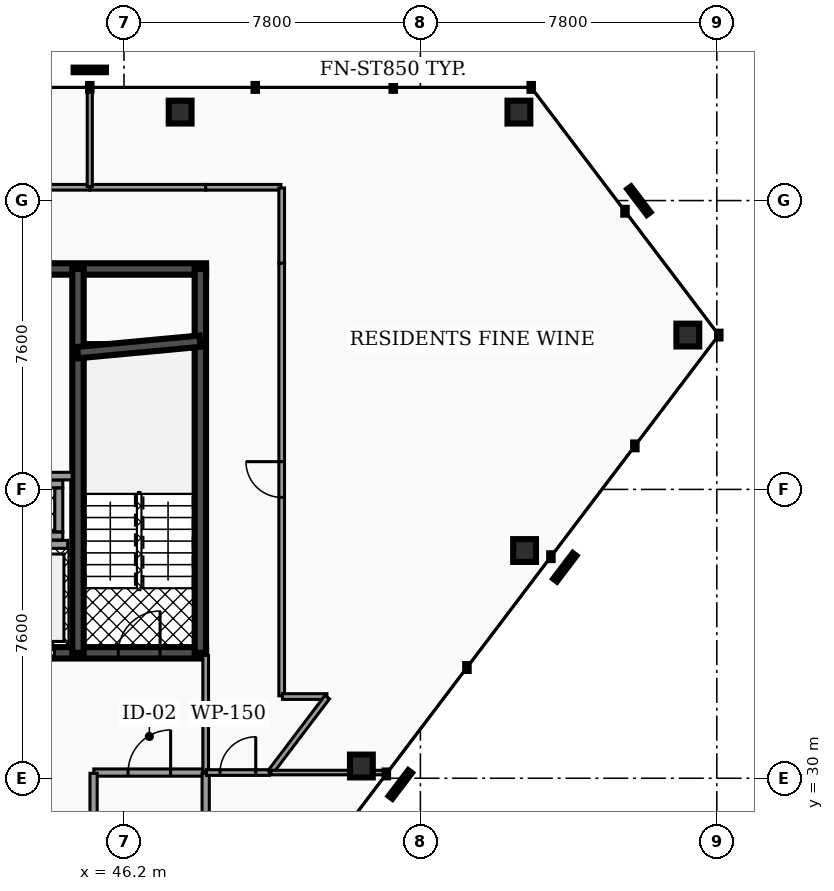
"""IFC4 building model, lengths in metres.
Left out: names, types, materials, properties, quantities, classifications, styles, units other than length and angle.
Written with IfcOpenShell. Run it as: python <this file> out.ifc"""

import sys

from ifc_helpers import new_model, si_unit, direction, frame, frame_2d, origin, origin_2d, place, context, subcontext, project, spatial, rectangle, hollow_rectangle, extrude, element, fill, save


model = new_model("IFC4")
c1 = context("Model", 3, precision=1e-05, world=origin(), true_north=direction((0.0, 1.0)))
c2 = subcontext(c1, "Body", "Model", "MODEL_VIEW")
j1 = project(units=[si_unit("LENGTHUNIT", "METRE"), si_unit("PLANEANGLEUNIT", "RADIAN")], contexts=[c1])
p1 = place(None, origin())
s1 = spatial("IfcSite", under=j1, at=p1, CompositionType="ELEMENT")
p2 = place(p1, origin())
s2 = spatial("IfcBuilding", under=s1, at=p2, CompositionType="ELEMENT")
p3 = place(p2, frame((0.0, 0.0, 235.96)))
s3 = spatial("IfcBuildingStorey", under=s2, at=p3, CompositionType="ELEMENT", Elevation=235.96)
p4 = place(p3, frame((28.5, 43.4, 0.0), z_axis=(0.0, 0.0, 1.0), x_axis=(1.0, 0.0, 0.0)))
e1 = element("IfcWall", 1, at=p4, inside=s3, PredefinedType="SHEAR", context=c2, shape_type="SweptSolid", body=[
    extrude(rectangle(XDim=19.86, YDim=0.3, at=frame_2d((9.93, 0.0))), origin(), (0.0, 0.0, 1.0), 3.18),
])
p5 = place(p3, frame((28.5, 33.3, 0.0), z_axis=(0.0, 0.0, 1.0), x_axis=(1.0, 0.0, 0.0)))
e2 = element("IfcWall", 2, at=p5, inside=s3, PredefinedType="SHEAR", context=c2, shape_type="SweptSolid", body=[
    extrude(rectangle(XDim=19.86, YDim=0.3, at=frame_2d((9.93, 0.0))), origin(), (0.0, 0.0, 1.0), 3.18),
])
p6 = place(p5, frame((3.93, 0.0, 0.0)))
e3 = element("IfcOpeningElement", 3, at=p6, cuts=e2, PredefinedType="OPENING", context=c2, shape_type="SweptSolid", body=[
    extrude(rectangle(XDim=1.1, YDim=2.15, at=frame_2d((0.55, 1.075))), frame((0.0, 0.16, 0.0), z_axis=(0.0, -1.0, 0.0), x_axis=(1.0, 0.0, 0.0)), (0.0, 0.0, 1.0), 0.32),
])
p7 = place(p5, frame((14.77, 0.0, 0.0)))
e4 = element("IfcOpeningElement", 4, at=p7, cuts=e2, PredefinedType="OPENING", context=c2, shape_type="SweptSolid", body=[
    extrude(rectangle(XDim=1.1, YDim=2.15, at=frame_2d((0.55, 1.075))), frame((0.0, 0.16, 0.0), z_axis=(0.0, -1.0, 0.0), x_axis=(1.0, 0.0, 0.0)), (0.0, 0.0, 1.0), 0.32),
])
p8 = place(p5, frame((11.25, 0.0, 0.0)))
e5 = element("IfcOpeningElement", 5, at=p8, cuts=e2, PredefinedType="OPENING", context=c2, shape_type="SweptSolid", body=[
    extrude(rectangle(XDim=1.0, YDim=2.1, at=frame_2d((0.5, 1.05))), frame((0.0, 0.16, 0.0), z_axis=(0.0, -1.0, 0.0), x_axis=(1.0, 0.0, 0.0)), (0.0, 0.0, 1.0), 0.32),
])
p9 = place(p5, frame((12.95, 0.0, 0.0)))
e6 = element("IfcOpeningElement", 6, at=p9, cuts=e2, PredefinedType="OPENING", context=c2, shape_type="SweptSolid", body=[
    extrude(rectangle(XDim=1.0, YDim=2.1, at=frame_2d((0.5, 1.05))), frame((0.0, 0.16, 0.0), z_axis=(0.0, -1.0, 0.0), x_axis=(1.0, 0.0, 0.0)), (0.0, 0.0, 1.0), 0.32),
])
p10 = place(p5, frame((5.85, 0.0, 0.0)))
e7 = element("IfcOpeningElement", 7, at=p10, cuts=e2, PredefinedType="OPENING", context=c2, shape_type="SweptSolid", body=[
    extrude(rectangle(XDim=1.0, YDim=2.1, at=frame_2d((0.5, 1.05))), frame((0.0, 0.16, 0.0), z_axis=(0.0, -1.0, 0.0), x_axis=(1.0, 0.0, 0.0)), (0.0, 0.0, 1.0), 0.32),
])
p11 = place(p5, frame((1.21, 0.0, 0.0)))
e8 = element("IfcOpeningElement", 8, at=p11, cuts=e2, PredefinedType="OPENING", context=c2, shape_type="SweptSolid", body=[
    extrude(rectangle(XDim=1.1, YDim=2.2, at=frame_2d((0.55, 1.1))), frame((0.0, 0.16, 0.0), z_axis=(0.0, -1.0, 0.0), x_axis=(1.0, 0.0, 0.0)), (0.0, 0.0, 1.0), 0.32),
])
p12 = place(p5, frame((9.34, 0.0, 0.0)))
e9 = element("IfcOpeningElement", 9, at=p12, cuts=e2, PredefinedType="OPENING", context=c2, shape_type="SweptSolid", body=[
    extrude(rectangle(XDim=1.12, YDim=2.05, at=frame_2d((0.56, 1.025))), frame((0.0, 0.16, 0.0), z_axis=(0.0, -1.0, 0.0), x_axis=(1.0, 0.0, 0.0)), (0.0, 0.0, 1.0), 0.32),
])
p13 = place(p5, frame((17.55, 0.0, 0.0)))
e10 = element("IfcOpeningElement", 10, at=p13, cuts=e2, PredefinedType="OPENING", context=c2, shape_type="SweptSolid", body=[
    extrude(rectangle(XDim=1.1, YDim=2.2, at=frame_2d((0.55, 1.1))), frame((0.0, 0.16, 0.0), z_axis=(0.0, -1.0, 0.0), x_axis=(1.0, 0.0, 0.0)), (0.0, 0.0, 1.0), 0.32),
])
for number, where, z_axis, x_axis in (
    (11, (44.99, 33.3, 0.0), (0.0, 0.0, 1.0), (0.0, 1.0, 0.0)),
    (12, (48.21, 33.3, 0.0), (0.0, 0.0, 1.0), (0.0, 1.0, 0.0)),
):
    element("IfcWall", number, at=place(p3, frame(where, z_axis=z_axis, x_axis=x_axis)), inside=s3, PredefinedType="SHEAR", context=c2, shape_type="SweptSolid", body=[
        extrude(rectangle(XDim=10.1, YDim=0.3, at=frame_2d((5.05, 0.0))), origin(), (0.0, 0.0, 1.0), 3.18),
    ])
p14 = place(p3, frame((44.98, 41.2, 0.0), z_axis=(0.0, 0.0, 1.0), x_axis=(0.995686468965, 0.09278176286, 0.0)))
e13 = element("IfcWall", 13, at=p14, inside=s3, PredefinedType="SHEAR", context=c2, shape_type="SweptSolid", body=[
    extrude(rectangle(XDim=3.234, YDim=0.3, at=frame_2d((1.617, 0.0))), origin(), (0.0, 0.0, 1.0), 3.18),
])
p15 = place(p3, frame((56.592, 47.528, 0.0), z_axis=(0.048126704161, -0.036631472275, 0.998169302065), x_axis=(0.605661387148, 0.795722491902, 0.0)))
e14 = element("IfcColumn", 14, at=p15, inside=s3, PredefinedType="COLUMN", context=c2, shape_type="SweptSolid", body=[
    extrude(hollow_rectangle(XDim=0.6, YDim=0.6, WallThickness=0.03, at=origin_2d()), origin(), (0.0, 0.0, 1.0), 3.186),
])
p16 = place(p3, frame((47.678, 47.528, 0.0), z_axis=(0.021171018176, -0.036665748869, 0.999103303392), x_axis=(0.866004557827, 0.500036104519, 0.0)))
e15 = element("IfcColumn", 15, at=p16, inside=s3, PredefinedType="COLUMN", context=c2, shape_type="SweptSolid", body=[
    extrude(hollow_rectangle(XDim=0.6, YDim=0.6, WallThickness=0.03, at=origin_2d()), origin(), (0.0, 0.0, 1.0), 3.183),
])
p17 = place(p3, frame((52.447, 30.323, 0.0), z_axis=(-0.083710636728, 0.093308034569, 0.992111959399), x_axis=(-0.744350700793, -0.667788914425, 0.0)))
e16 = element("IfcColumn", 16, at=p17, inside=s3, PredefinedType="COLUMN", context=c2, shape_type="SweptSolid", body=[
    extrude(hollow_rectangle(XDim=0.6, YDim=0.6, WallThickness=0.03, at=origin_2d()), origin(), (0.0, 0.0, 1.0), 3.205),
])
p18 = place(p3, frame((56.742, 35.992, 0.0), z_axis=(-0.075375047062, 0.104383019719, 0.991676755538), x_axis=(-0.810726005179, -0.585425780545, 0.0)))
e17 = element("IfcColumn", 17, at=p18, inside=s3, PredefinedType="COLUMN", context=c2, shape_type="SweptSolid", body=[
    extrude(hollow_rectangle(XDim=0.6, YDim=0.6, WallThickness=0.03, at=origin_2d()), origin(), (0.0, 0.0, 1.0), 3.207),
])
p19 = place(p3, frame((61.037, 41.661, 0.0), z_axis=(-0.067035657533, 0.115200891606, 0.991077683732), x_axis=(-0.864316753447, -0.502947859833, 0.0)))
e18 = element("IfcColumn", 18, at=p19, inside=s3, PredefinedType="COLUMN", context=c2, shape_type="SweptSolid", body=[
    extrude(hollow_rectangle(XDim=0.6, YDim=0.6, WallThickness=0.03, at=origin_2d()), origin(), (0.0, 0.0, 1.0), 3.208),
])
p20 = place(p3, frame((42.92, 36.155, 0.0), z_axis=(0.0, 0.0, 1.0), x_axis=(1.0, 0.0, 0.0)))
e19 = element("IfcWall", 19, at=p20, inside=s3, PredefinedType="SOLIDWALL", context=c2, shape_type="SweptSolid", body=[
    extrude(rectangle(XDim=1.8, YDim=0.21, at=frame_2d((0.9, 0.0))), origin(), (0.0, 0.0, 1.0), 3.18),
])
for number, where, z_axis, x_axis in (
    (20, (42.99, 36.375, 0.0), (0.0, 0.0, 1.0), (1.0, 0.0, 0.0)),
    (21, (42.99, 37.745, 0.0), (0.0, 0.0, 1.0), (1.0, 0.0, 0.0)),
):
    element("IfcWall", number, at=place(p3, frame(where, z_axis=z_axis, x_axis=x_axis)), inside=s3, PredefinedType="SOLIDWALL", context=c2, shape_type="SweptSolid", body=[
        extrude(rectangle(XDim=1.6, YDim=0.21, at=frame_2d((0.8, 0.0))), origin(), (0.0, 0.0, 1.0), 3.18),
    ])
p21 = place(p3, frame((44.485, 36.485, 0.0), z_axis=(0.0, 0.0, 1.0), x_axis=(0.0, 1.0, 0.0)))
e22 = element("IfcWall", 22, at=p21, inside=s3, PredefinedType="SOLIDWALL", context=c2, shape_type="SweptSolid", body=[
    extrude(rectangle(XDim=1.15, YDim=0.21, at=frame_2d((0.575, 0.0))), origin(), (0.0, 0.0, 1.0), 3.18),
])
p22 = place(p3, frame((41.22, 37.95, 0.0), z_axis=(0.0, 0.0, 1.0), x_axis=(1.0, 0.0, 0.0)))
e23 = element("IfcWall", 23, at=p22, inside=s3, PredefinedType="PARTITIONING", context=c2, shape_type="SweptSolid", body=[
    extrude(rectangle(XDim=3.615, YDim=0.2, at=frame_2d((1.808, 0.0))), origin(), (0.0, 0.0, 1.0), 2.235),
])
p23 = place(p3, frame((45.405, 30.15, 0.0), z_axis=(0.0, 0.0, 1.0), x_axis=(1.0, 0.0, 0.0)))
e24 = element("IfcWall", 24, at=p23, inside=s3, PredefinedType="PARTITIONING", context=c2, shape_type="SweptSolid", body=[
    extrude(rectangle(XDim=2.925, YDim=0.19, at=frame_2d((1.462, 0.0))), origin(), (0.0, 0.0, 1.0), 2.235),
])
p24 = place(p23, frame((0.903, 0.0, 0.0)))
e25 = element("IfcOpeningElement", 25, at=p24, cuts=e24, PredefinedType="OPENING", context=c2, shape_type="SweptSolid", body=[
    extrude(rectangle(XDim=1.12, YDim=2.05, at=frame_2d((0.56, 1.025))), frame((0.0, 0.105, 0.0), z_axis=(0.0, -1.0, 0.0), x_axis=(1.0, 0.0, 0.0)), (0.0, 0.0, 1.0), 0.21),
])
p25 = place(p3, frame((48.35, 30.17, 0.0), z_axis=(0.0, 0.0, 1.0), x_axis=(0.0, 1.0, 0.0)))
e26 = element("IfcWall", 26, at=p25, inside=s3, PredefinedType="PARTITIONING", context=c2, shape_type="SweptSolid", body=[
    extrude(rectangle(XDim=3.06, YDim=0.15, at=frame_2d((1.53, 0.0))), origin(), (0.0, 0.0, 1.0), 2.235),
])
for number, where, z_axis, x_axis in (
    (27, (45.4, 27.37, 0.0), (0.0, 0.0, 1.0), (0.0, 1.0, 0.0)),
    (28, (48.35, 27.37, 0.0), (0.0, 0.0, 1.0), (0.0, 1.0, 0.0)),
):
    element("IfcWall", number, at=place(p3, frame(where, z_axis=z_axis, x_axis=x_axis)), inside=s3, PredefinedType="PARTITIONING", context=c2, shape_type="SweptSolid", body=[
        extrude(rectangle(XDim=2.76, YDim=0.19, at=frame_2d((1.38, 0.0))), origin(), (0.0, 0.0, 1.0), 2.235),
    ])
p26 = place(p3, frame((48.37, 30.15, 0.0), z_axis=(0.0, 0.0, 1.0), x_axis=(1.0, 0.0, 0.0)))
e29 = element("IfcWall", 29, at=p26, inside=s3, PredefinedType="PARTITIONING", context=c2, shape_type="SweptSolid", body=[
    extrude(rectangle(XDim=1.655, YDim=0.15, at=frame_2d((0.828, 0.0))), origin(), (0.0, 0.0, 1.0), 2.235),
])
p27 = place(p26, frame((0.358, 0.0, 0.0)))
e30 = element("IfcOpeningElement", 30, at=p27, cuts=e29, PredefinedType="OPENING", context=c2, shape_type="SweptSolid", body=[
    extrude(rectangle(XDim=0.94, YDim=2.05, at=frame_2d((0.47, 1.025))), frame((0.0, 0.085, 0.0), z_axis=(0.0, -1.0, 0.0), x_axis=(1.0, 0.0, 0.0)), (0.0, 0.0, 1.0), 0.17),
])
p28 = place(p3, frame((45.305, 45.55, 0.0), z_axis=(0.0, 0.0, 1.0), x_axis=(1.0, 0.0, 0.0)))
e31 = element("IfcWall", 31, at=p28, inside=s3, PredefinedType="PARTITIONING", context=c2, shape_type="SweptSolid", body=[
    extrude(rectangle(XDim=3.045, YDim=0.15, at=frame_2d((1.522, 0.0))), origin(), (0.0, 0.0, 1.0), 2.235),
])
for number, where, z_axis, x_axis in (
    (32, (48.35, 45.55, 0.0), (0.0, 0.0, 1.0), (1.0, 0.0, 0.0)),
    (33, (50.35, 43.55, 0.0), (0.0, 0.0, 1.0), (0.0, 1.0, 0.0)),
):
    element("IfcWall", number, at=place(p3, frame(where, z_axis=z_axis, x_axis=x_axis)), inside=s3, PredefinedType="PARTITIONING", context=c2, shape_type="SweptSolid", body=[
        extrude(rectangle(XDim=1.98, YDim=0.15, at=frame_2d((0.99, 0.0))), origin(), (0.0, 0.0, 1.0), 2.235),
    ])
p29 = place(p3, frame((50.35, 32.17, 0.0), z_axis=(0.0, 0.0, 1.0), x_axis=(0.0, 1.0, 0.0)))
e34 = element("IfcWall", 34, at=p29, inside=s3, PredefinedType="PARTITIONING", context=c2, shape_type="SweptSolid", body=[
    extrude(rectangle(XDim=11.38, YDim=0.15, at=frame_2d((5.69, 0.0))), origin(), (0.0, 0.0, 1.0), 2.235),
])
p30 = place(p29, frame((5.22, 0.0, 0.0)))
e35 = element("IfcOpeningElement", 35, at=p30, cuts=e34, PredefinedType="OPENING", context=c2, shape_type="SweptSolid", body=[
    extrude(rectangle(XDim=0.94, YDim=2.05, at=frame_2d((0.47, 1.025))), frame((0.0, 0.085, 0.0), z_axis=(0.0, -1.0, 0.0), x_axis=(1.0, 0.0, 0.0)), (0.0, 0.0, 1.0), 0.17),
])
p31 = place(p3, frame((50.37, 32.15, 0.0), z_axis=(0.0, 0.0, 1.0), x_axis=(1.0, 0.0, 0.0)))
e36 = element("IfcWall", 36, at=p31, inside=s3, PredefinedType="PARTITIONING", context=c2, shape_type="SweptSolid", body=[
    extrude(rectangle(XDim=1.17, YDim=0.15, at=frame_2d((0.585, 0.0))), origin(), (0.0, 0.0, 1.0), 2.235),
])
p32 = place(p3, frame((50.057, 30.166, 0.0), z_axis=(0.0, 0.0, 1.0), x_axis=(0.603869110647, 0.797083494502, 0.0)))
e37 = element("IfcWall", 37, at=p32, inside=s3, PredefinedType="PARTITIONING", context=c2, shape_type="SweptSolid", body=[
    extrude(rectangle(XDim=2.469, YDim=0.15, at=frame_2d((1.234, 0.0))), origin(), (0.0, 0.0, 1.0), 2.235),
])
p33 = place(p3, frame((40.779, 45.55, 0.0), z_axis=(0.0, 0.0, 1.0), x_axis=(1.0, 0.0, 0.0)))
e38 = element("IfcWall", 38, at=p33, inside=s3, PredefinedType="PARTITIONING", context=c2, shape_type="SweptSolid", body=[
    extrude(rectangle(XDim=4.516, YDim=0.15, at=frame_2d((2.258, 0.0))), origin(), (0.0, 0.0, 1.0), 2.235),
])
p34 = place(p3, frame((50.065, 30.15, 0.0), z_axis=(0.0, 0.0, 1.0), x_axis=(1.0, 0.0, 0.0)))
e39 = element("IfcWall", 39, at=p34, inside=s3, PredefinedType="PARTITIONING", context=c2, shape_type="SweptSolid", body=[
    extrude(rectangle(XDim=2.131, YDim=0.12, at=frame_2d((1.066, 0.0))), origin(), (0.0, 0.0, 1.0), 2.235),
])
p35 = place(p3, frame((52.404, 30.15, 0.0), z_axis=(0.0, 0.0, 1.0), x_axis=(1.0, 0.0, 0.0)))
e40 = element("IfcWall", 40, at=p35, inside=s3, PredefinedType="PARTITIONING", context=c2, shape_type="SweptSolid", body=[
    extrude(rectangle(XDim=0.713, YDim=0.12, at=frame_2d((0.356, 0.0))), origin(), (0.0, 0.0, 1.0), 2.235),
])
p36 = place(p3, frame((45.3, 45.57, 0.0), z_axis=(0.0, 0.0, 1.0), x_axis=(0.0, 1.0, 0.0)))
e41 = element("IfcWall", 41, at=p36, inside=s3, PredefinedType="PARTITIONING", context=c2, shape_type="SweptSolid", body=[
    extrude(rectangle(XDim=2.593, YDim=0.135, at=frame_2d((1.296, 0.0))), origin(), (0.0, 0.0, 1.0), 2.235),
])
p37 = place(p7, origin())
e42 = element("IfcDoor", 42, at=p37, inside=s3, OperationType="SLIDING_TO_RIGHT", PredefinedType="DOOR", context=c2, shape_type="SweptSolid", body=[
    extrude(rectangle(XDim=1.1, YDim=2.15, at=frame_2d((0.55, 1.075))), frame((0.0, 0.025, 0.0), z_axis=(0.0, -1.0, 0.0), x_axis=(1.0, 0.0, 0.0)), (0.0, 0.0, 1.0), 0.05),
])
fill(e4, e42)
p38 = place(p13, origin())
e43 = element("IfcDoor", 43, at=p38, inside=s3, OperationType="SINGLE_SWING_RIGHT", PredefinedType="DOOR", context=c2, shape_type="SweptSolid", body=[
    extrude(rectangle(XDim=1.1, YDim=2.2, at=frame_2d((0.55, 1.1))), frame((0.0, 0.025, 0.0), z_axis=(0.0, -1.0, 0.0), x_axis=(1.0, 0.0, 0.0)), (0.0, 0.0, 1.0), 0.05),
])
fill(e10, e43)
p39 = place(p24, origin())
e44 = element("IfcDoor", 44, at=p39, inside=s3, OperationType="SINGLE_SWING_RIGHT", PredefinedType="DOOR", context=c2, shape_type="SweptSolid", body=[
    extrude(rectangle(XDim=1.12, YDim=2.05, at=frame_2d((0.56, 1.025))), frame((0.0, 0.025, 0.0), z_axis=(0.0, -1.0, 0.0), x_axis=(1.0, 0.0, 0.0)), (0.0, 0.0, 1.0), 0.05),
])
fill(e25, e44)
p40 = place(p27, origin())
e45 = element("IfcDoor", 45, at=p40, inside=s3, OperationType="SINGLE_SWING_RIGHT", PredefinedType="DOOR", context=c2, shape_type="SweptSolid", body=[
    extrude(rectangle(XDim=0.94, YDim=2.05, at=frame_2d((0.47, 1.025))), frame((0.0, 0.025, 0.0), z_axis=(0.0, -1.0, 0.0), x_axis=(1.0, 0.0, 0.0)), (0.0, 0.0, 1.0), 0.05),
])
fill(e30, e45)
p41 = place(p30, origin())
e46 = element("IfcDoor", 46, at=p41, inside=s3, OperationType="SINGLE_SWING_RIGHT", PredefinedType="DOOR", context=c2, shape_type="SweptSolid", body=[
    extrude(rectangle(XDim=0.94, YDim=2.05, at=frame_2d((0.47, 1.025))), frame((0.0, 0.025, 0.0), z_axis=(0.0, -1.0, 0.0), x_axis=(1.0, 0.0, 0.0)), (0.0, 0.0, 1.0), 0.05),
])
fill(e35, e46)
save(model, sys.argv[1])
